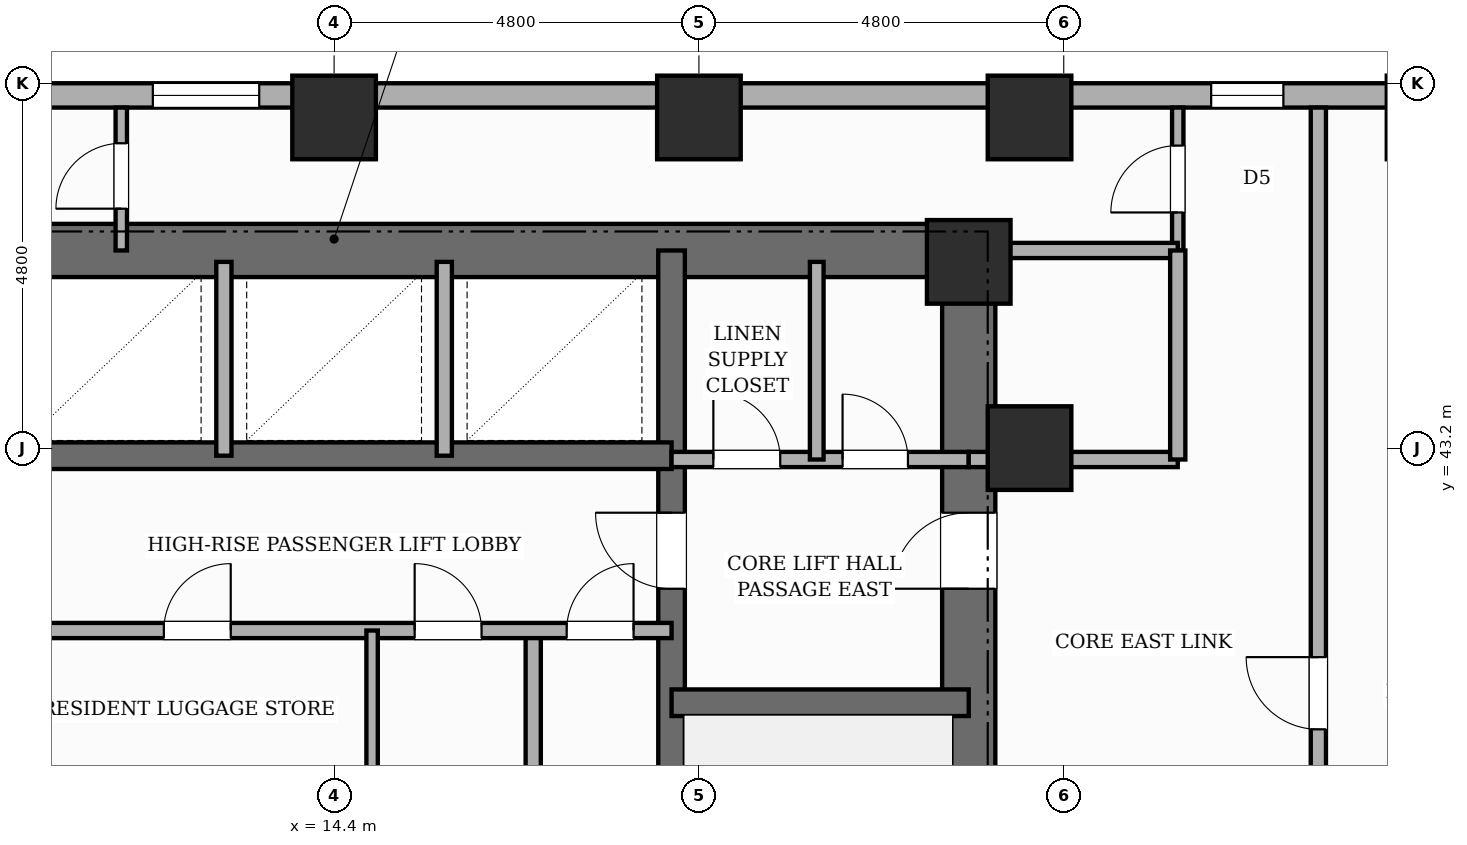
"""IFC4 building model, lengths in metres.
Left out: names, types, materials, properties, quantities, classifications, styles, units other than length and angle.
Written with IfcOpenShell. Run it as: python <this file> out.ifc"""

import sys

from ifc_helpers import new_model, si_unit, direction, frame, frame_2d, origin, origin_2d, place, context, subcontext, project, spatial, rectangle, extrude, element, fill, save


model = new_model("IFC4")
c1 = context("Model", 3, precision=1e-05, world=origin(), true_north=direction((0.0, 1.0)))
c2 = subcontext(c1, "Body", "Model", "MODEL_VIEW")
j1 = project(units=[si_unit("LENGTHUNIT", "METRE"), si_unit("PLANEANGLEUNIT", "RADIAN")], contexts=[c1])
p1 = place(None, origin())
s1 = spatial("IfcSite", under=j1, at=p1, CompositionType="ELEMENT")
p2 = place(p1, origin())
s2 = spatial("IfcBuilding", under=s1, at=p2, CompositionType="ELEMENT")
p3 = place(p2, frame((0.0, 0.0, 28.6)))
s3 = spatial("IfcBuildingStorey", under=s2, at=p3, CompositionType="ELEMENT", Elevation=28.6)
p4 = place(p3, frame((22.75, 30.55, 0.0), z_axis=(0.0, 0.0, 1.0), x_axis=(0.0, 1.0, 0.0)))
e1 = element("IfcWall", 1, at=p4, inside=s3, PredefinedType="SHEAR", context=c2, shape_type="SweptSolid", body=[
    extrude(rectangle(XDim=15.6, YDim=0.7, at=frame_2d((7.8, 0.0))), origin(), (0.0, 0.0, 1.0), 3.6),
])
p5 = place(p4, frame((10.8, 0.0, 0.0)))
e2 = element("IfcOpeningElement", 2, at=p5, cuts=e1, PredefinedType="OPENING", context=c2, shape_type="SweptSolid", body=[
    extrude(rectangle(XDim=1.0, YDim=2.15, at=frame_2d((0.5, 1.075))), frame((0.0, 0.36, 0.0), z_axis=(0.0, -1.0, 0.0), x_axis=(1.0, 0.0, 0.0)), (0.0, 0.0, 1.0), 0.72),
])
p6 = place(p3, frame((6.05, 45.8, 0.0), z_axis=(0.0, 0.0, 1.0), x_axis=(1.0, 0.0, 0.0)))
e3 = element("IfcWall", 3, at=p6, inside=s3, PredefinedType="SHEAR", context=c2, shape_type="SweptSolid", body=[
    extrude(rectangle(XDim=16.7, YDim=0.7, at=frame_2d((8.35, 0.0))), origin(), (0.0, 0.0, 1.0), 3.6),
])
p7 = place(p3, frame((18.84, 30.9, 0.0), z_axis=(0.0, 0.0, 1.0), x_axis=(0.0, 1.0, 0.0)))
e4 = element("IfcWall", 4, at=p7, inside=s3, PredefinedType="SHEAR", context=c2, shape_type="SweptSolid", body=[
    extrude(rectangle(XDim=14.9, YDim=0.35, at=frame_2d((7.45, 0.0))), origin(), (0.0, 0.0, 1.0), 3.6),
])
p8 = place(p7, frame((0.65, 0.0, 0.0)))
e5 = element("IfcOpeningElement", 5, at=p8, cuts=e4, PredefinedType="OPENING", context=c2, shape_type="SweptSolid", body=[
    extrude(rectangle(XDim=0.95, YDim=2.1, at=frame_2d((0.475, 1.05))), frame((0.0, 0.185, 0.0), z_axis=(0.0, -1.0, 0.0), x_axis=(1.0, 0.0, 0.0)), (0.0, 0.0, 1.0), 0.37),
])
p9 = place(p7, frame((10.45, 0.0, 0.0)))
e6 = element("IfcOpeningElement", 6, at=p9, cuts=e4, PredefinedType="OPENING", context=c2, shape_type="SweptSolid", body=[
    extrude(rectangle(XDim=1.0, YDim=2.15, at=frame_2d((0.5, 1.075))), frame((0.0, 0.185, 0.0), z_axis=(0.0, -1.0, 0.0), x_axis=(1.0, 0.0, 0.0)), (0.0, 0.0, 1.0), 0.37),
])
p10 = place(p3, frame((18.84, 39.85, 0.0), z_axis=(0.0, 0.0, 1.0), x_axis=(1.0, 0.0, 0.0)))
e7 = element("IfcWall", 7, at=p10, inside=s3, PredefinedType="SHEAR", context=c2, shape_type="SweptSolid", body=[
    extrude(rectangle(XDim=3.91, YDim=0.35, at=frame_2d((1.955, 0.0))), origin(), (0.0, 0.0, 1.0), 3.6),
])
p11 = place(p3, frame((9.96, 43.1, 0.0), z_axis=(0.0, 0.0, 1.0), x_axis=(1.0, 0.0, 0.0)))
e8 = element("IfcWall", 8, at=p11, inside=s3, PredefinedType="SHEAR", context=c2, shape_type="SweptSolid", body=[
    extrude(rectangle(XDim=8.88, YDim=0.35, at=frame_2d((4.44, 0.0))), origin(), (0.0, 0.0, 1.0), 3.6),
])
for number, where, z_axis, x_axis in (
    (9, (14.4, 47.55, 0.0), (0.0, 0.0, 1.0), (1.0, 0.0, 0.0)),
    (10, (19.2, 47.55, 0.0), (0.0, 0.0, 1.0), (1.0, 0.0, 0.0)),
    (11, (22.75, 45.65, 0.0), (0.0, 0.0, 1.0), (1.0, 0.0, 0.0)),
    (12, (23.55, 43.2, 0.0), (0.0, 0.0, 1.0), (1.0, 0.0, 0.0)),
    (13, (23.55, 47.55, 0.0), (0.0, 0.0, 1.0), (1.0, 0.0, 0.0)),
):
    element("IfcColumn", number, at=place(p3, frame(where, z_axis=z_axis, x_axis=x_axis)), inside=s3, PredefinedType="COLUMN", context=c2, shape_type="SweptSolid", body=[
        extrude(rectangle(XDim=1.1, YDim=1.1, at=origin_2d()), origin(), (0.0, 0.0, 1.0), 3.6),
    ])
p12 = place(p3, frame((7.2, 47.84, 0.0), z_axis=(0.0, 0.0, 1.0), x_axis=(1.0, 0.0, 0.0)))
e14 = element("IfcWall", 14, at=p12, inside=s3, PredefinedType="STANDARD", context=c2, shape_type="SweptSolid", body=[
    extrude(rectangle(XDim=48.0, YDim=0.32, at=frame_2d((24.0, 0.0))), origin(), (0.0, 0.0, 1.0), 2.53),
])
p13 = place(p12, frame((24.97, 0.0, 0.45)))
e15 = element("IfcOpeningElement", 15, at=p13, cuts=e14, PredefinedType="OPENING", context=c2, shape_type="SweptSolid", body=[
    extrude(rectangle(XDim=0.6, YDim=1.8, at=frame_2d((0.3, 0.9))), frame((0.0, 0.17, 0.0), z_axis=(0.0, -1.0, 0.0), x_axis=(1.0, 0.0, 0.0)), (0.0, 0.0, 1.0), 0.34),
])
p14 = place(p12, frame((32.435, 0.0, 0.65)))
e16 = element("IfcOpeningElement", 16, at=p14, cuts=e14, PredefinedType="OPENING", context=c2, shape_type="SweptSolid", body=[
    extrude(rectangle(XDim=1.4, YDim=1.1, at=frame_2d((0.7, 0.55))), frame((0.0, 0.17, 0.0), z_axis=(0.0, -1.0, 0.0), x_axis=(1.0, 0.0, 0.0)), (0.0, 0.0, 1.0), 0.34),
])
p15 = place(p12, frame((47.094, 0.0, 0.45)))
e17 = element("IfcOpeningElement", 17, at=p15, cuts=e14, PredefinedType="OPENING", context=c2, shape_type="SweptSolid", body=[
    extrude(rectangle(XDim=0.6, YDim=1.8, at=frame_2d((0.3, 0.9))), frame((0.0, 0.17, 0.0), z_axis=(0.0, -1.0, 0.0), x_axis=(1.0, 0.0, 0.0)), (0.0, 0.0, 1.0), 0.34),
])
p16 = place(p12, frame((18.74, 0.0, 0.45)))
e18 = element("IfcOpeningElement", 18, at=p16, cuts=e14, PredefinedType="OPENING", context=c2, shape_type="SweptSolid", body=[
    extrude(rectangle(XDim=0.95, YDim=1.8, at=frame_2d((0.475, 0.9))), frame((0.0, 0.17, 0.0), z_axis=(0.0, -1.0, 0.0), x_axis=(1.0, 0.0, 0.0)), (0.0, 0.0, 1.0), 0.34),
])
p17 = place(p12, frame((41.65, 0.0, 0.45)))
e19 = element("IfcOpeningElement", 19, at=p17, cuts=e14, PredefinedType="OPENING", context=c2, shape_type="SweptSolid", body=[
    extrude(rectangle(XDim=0.75, YDim=1.8, at=frame_2d((0.375, 0.9))), frame((0.0, 0.17, 0.0), z_axis=(0.0, -1.0, 0.0), x_axis=(1.0, 0.0, 0.0)), (0.0, 0.0, 1.0), 0.34),
])
p18 = place(p12, frame((37.736, 0.0, 0.65)))
e20 = element("IfcOpeningElement", 20, at=p18, cuts=e14, PredefinedType="OPENING", context=c2, shape_type="SweptSolid", body=[
    extrude(rectangle(XDim=1.4, YDim=1.1, at=frame_2d((0.7, 0.55))), frame((0.0, 0.17, 0.0), z_axis=(0.0, -1.0, 0.0), x_axis=(1.0, 0.0, 0.0)), (0.0, 0.0, 1.0), 0.34),
])
p19 = place(p12, frame((0.47, 0.0, 0.45)))
e21 = element("IfcOpeningElement", 21, at=p19, cuts=e14, PredefinedType="OPENING", context=c2, shape_type="SweptSolid", body=[
    extrude(rectangle(XDim=0.95, YDim=1.8, at=frame_2d((0.475, 0.9))), frame((0.0, 0.17, 0.0), z_axis=(0.0, -1.0, 0.0), x_axis=(1.0, 0.0, 0.0)), (0.0, 0.0, 1.0), 0.34),
])
p20 = place(p12, frame((4.815, 0.0, 0.65)))
e22 = element("IfcOpeningElement", 22, at=p20, cuts=e14, PredefinedType="OPENING", context=c2, shape_type="SweptSolid", body=[
    extrude(rectangle(XDim=1.4, YDim=1.1, at=frame_2d((0.7, 0.55))), frame((0.0, 0.17, 0.0), z_axis=(0.0, -1.0, 0.0), x_axis=(1.0, 0.0, 0.0)), (0.0, 0.0, 1.0), 0.34),
])
p21 = place(p12, frame((22.87, 0.0, 0.65)))
e23 = element("IfcOpeningElement", 23, at=p21, cuts=e14, PredefinedType="OPENING", context=c2, shape_type="SweptSolid", body=[
    extrude(rectangle(XDim=1.4, YDim=1.1, at=frame_2d((0.7, 0.55))), frame((0.0, 0.17, 0.0), z_axis=(0.0, -1.0, 0.0), x_axis=(1.0, 0.0, 0.0)), (0.0, 0.0, 1.0), 0.34),
])
p22 = place(p12, frame((28.03, 0.0, 0.65)))
e24 = element("IfcOpeningElement", 24, at=p22, cuts=e14, PredefinedType="OPENING", context=c2, shape_type="SweptSolid", body=[
    extrude(rectangle(XDim=1.4, YDim=1.1, at=frame_2d((0.7, 0.55))), frame((0.0, 0.17, 0.0), z_axis=(0.0, -1.0, 0.0), x_axis=(1.0, 0.0, 0.0)), (0.0, 0.0, 1.0), 0.34),
])
p23 = place(p12, frame((42.95, 0.0, 0.65)))
e25 = element("IfcOpeningElement", 25, at=p23, cuts=e14, PredefinedType="OPENING", context=c2, shape_type="SweptSolid", body=[
    extrude(rectangle(XDim=1.4, YDim=1.1, at=frame_2d((0.7, 0.55))), frame((0.0, 0.17, 0.0), z_axis=(0.0, -1.0, 0.0), x_axis=(1.0, 0.0, 0.0)), (0.0, 0.0, 1.0), 0.34),
])
p24 = place(p12, frame((45.984, 0.0, 0.45)))
e26 = element("IfcOpeningElement", 26, at=p24, cuts=e14, PredefinedType="OPENING", context=c2, shape_type="SweptSolid", body=[
    extrude(rectangle(XDim=0.6, YDim=1.8, at=frame_2d((0.3, 0.9))), frame((0.0, 0.17, 0.0), z_axis=(0.0, -1.0, 0.0), x_axis=(1.0, 0.0, 0.0)), (0.0, 0.0, 1.0), 0.34),
])
p25 = place(p3, frame((17.02, 35.65, 0.0), z_axis=(0.0, 0.0, 1.0), x_axis=(0.0, 1.0, 0.0)))
e27 = element("IfcWall", 27, at=p25, inside=s3, PredefinedType="POLYGONAL", context=c2, shape_type="SweptSolid", body=[
    extrude(rectangle(XDim=5.15, YDim=0.2, at=frame_2d((2.575, 0.0))), origin(), (0.0, 0.0, 1.0), 3.35),
])
p26 = place(p3, frame((9.96, 40.8, 0.0), z_axis=(0.0, 0.0, 1.0), x_axis=(1.0, 0.0, 0.0)))
e28 = element("IfcWall", 28, at=p26, inside=s3, PredefinedType="POLYGONAL", context=c2, shape_type="SweptSolid", body=[
    extrude(rectangle(XDim=8.88, YDim=0.2, at=frame_2d((4.44, 0.0))), origin(), (0.0, 0.0, 1.0), 3.35),
])
p27 = place(p26, frame((7.5, 0.0, 0.0)))
e29 = element("IfcOpeningElement", 29, at=p27, cuts=e28, PredefinedType="OPENING", context=c2, shape_type="SweptSolid", body=[
    extrude(rectangle(XDim=0.88, YDim=2.1, at=frame_2d((0.44, 1.05))), frame((0.0, 0.11, 0.0), z_axis=(0.0, -1.0, 0.0), x_axis=(1.0, 0.0, 0.0)), (0.0, 0.0, 1.0), 0.22),
])
p28 = place(p26, frame((2.2, 0.0, 0.0)))
e30 = element("IfcOpeningElement", 30, at=p28, cuts=e28, PredefinedType="OPENING", context=c2, shape_type="SweptSolid", body=[
    extrude(rectangle(XDim=0.88, YDim=2.1, at=frame_2d((0.44, 1.05))), frame((0.0, 0.11, 0.0), z_axis=(0.0, -1.0, 0.0), x_axis=(1.0, 0.0, 0.0)), (0.0, 0.0, 1.0), 0.22),
])
p29 = place(p26, frame((5.5, 0.0, 0.0)))
e31 = element("IfcOpeningElement", 31, at=p29, cuts=e28, PredefinedType="OPENING", context=c2, shape_type="SweptSolid", body=[
    extrude(rectangle(XDim=0.88, YDim=2.1, at=frame_2d((0.44, 1.05))), frame((0.0, 0.11, 0.0), z_axis=(0.0, -1.0, 0.0), x_axis=(1.0, 0.0, 0.0)), (0.0, 0.0, 1.0), 0.22),
])
p30 = place(p3, frame((18.84, 43.05, 0.0), z_axis=(0.0, 0.0, 1.0), x_axis=(1.0, 0.0, 0.0)))
e32 = element("IfcWall", 32, at=p30, inside=s3, PredefinedType="POLYGONAL", context=c2, shape_type="SweptSolid", body=[
    extrude(rectangle(XDim=3.91, YDim=0.2, at=frame_2d((1.955, 0.0))), origin(), (0.0, 0.0, 1.0), 2.53),
])
p31 = place(p30, frame((0.55, 0.0, 0.0)))
e33 = element("IfcOpeningElement", 33, at=p31, cuts=e32, PredefinedType="OPENING", context=c2, shape_type="SweptSolid", body=[
    extrude(rectangle(XDim=0.88, YDim=2.1, at=frame_2d((0.44, 1.05))), frame((0.0, 0.11, 0.0), z_axis=(0.0, -1.0, 0.0), x_axis=(1.0, 0.0, 0.0)), (0.0, 0.0, 1.0), 0.22),
])
p32 = place(p30, frame((2.25, 0.0, 0.0)))
e34 = element("IfcOpeningElement", 34, at=p32, cuts=e32, PredefinedType="OPENING", context=c2, shape_type="SweptSolid", body=[
    extrude(rectangle(XDim=0.86, YDim=2.1, at=frame_2d((0.43, 1.05))), frame((0.0, 0.11, 0.0), z_axis=(0.0, -1.0, 0.0), x_axis=(1.0, 0.0, 0.0)), (0.0, 0.0, 1.0), 0.22),
])
for number, where, z_axis, x_axis in (
    (35, (12.95, 43.1, 0.0), (0.0, 0.0, 1.0), (0.0, 1.0, 0.0)),
    (36, (15.85, 43.1, 0.0), (0.0, 0.0, 1.0), (0.0, 1.0, 0.0)),
):
    element("IfcWall", number, at=place(p3, frame(where, z_axis=z_axis, x_axis=x_axis)), inside=s3, PredefinedType="POLYGONAL", context=c2, shape_type="SweptSolid", body=[
        extrude(rectangle(XDim=2.55, YDim=0.2, at=frame_2d((1.275, 0.0))), origin(), (0.0, 0.0, 1.0), 3.35),
    ])
p33 = place(p3, frame((14.9, 38.72, 0.0), z_axis=(0.0, 0.0, 1.0), x_axis=(0.0, 1.0, 0.0)))
e37 = element("IfcWall", 37, at=p33, inside=s3, PredefinedType="PARTITIONING", context=c2, shape_type="SweptSolid", body=[
    extrude(rectangle(XDim=2.08, YDim=0.15, at=frame_2d((1.04, 0.0))), origin(), (0.0, 0.0, 1.0), 3.35),
])
p34 = place(p3, frame((20.75, 43.05, 0.0), z_axis=(0.0, 0.0, 1.0), x_axis=(0.0, 1.0, 0.0)))
e38 = element("IfcWall", 38, at=p34, inside=s3, PredefinedType="PLUMBINGWALL", context=c2, shape_type="SweptSolid", body=[
    extrude(rectangle(XDim=2.6, YDim=0.18, at=frame_2d((1.3, 0.0))), origin(), (0.0, 0.0, 1.0), 3.35),
])
p35 = place(p3, frame((25.5, 45.8, 0.0), z_axis=(0.0, 0.0, 1.0), x_axis=(0.0, 1.0, 0.0)))
e39 = element("IfcWall", 39, at=p35, inside=s3, PredefinedType="PARTITIONING", context=c2, shape_type="SweptSolid", body=[
    extrude(rectangle(XDim=1.88, YDim=0.15, at=frame_2d((0.94, 0.0))), origin(), (0.0, 0.0, 1.0), 3.35),
])
p36 = place(p35, frame((0.5, 0.0, 0.0)))
e40 = element("IfcOpeningElement", 40, at=p36, cuts=e39, PredefinedType="OPENING", context=c2, shape_type="SweptSolid", body=[
    extrude(rectangle(XDim=0.88, YDim=2.1, at=frame_2d((0.44, 1.05))), frame((0.0, 0.085, 0.0), z_axis=(0.0, -1.0, 0.0), x_axis=(1.0, 0.0, 0.0)), (0.0, 0.0, 1.0), 0.17),
])
p37 = place(p3, frame((22.75, 45.8, 0.0), z_axis=(0.0, 0.0, 1.0), x_axis=(1.0, 0.0, 0.0)))
e41 = element("IfcWall", 41, at=p37, inside=s3, PredefinedType="PARTITIONING", context=c2, shape_type="SweptSolid", body=[
    extrude(rectangle(XDim=2.75, YDim=0.2, at=frame_2d((1.375, 0.0))), origin(), (0.0, 0.0, 1.0), 3.35),
])
p38 = place(p3, frame((11.6, 45.8, 0.0), z_axis=(0.0, 0.0, 1.0), x_axis=(0.0, 1.0, 0.0)))
e42 = element("IfcWall", 42, at=p38, inside=s3, PredefinedType="PARTITIONING", context=c2, shape_type="SweptSolid", body=[
    extrude(rectangle(XDim=1.88, YDim=0.15, at=frame_2d((0.94, 0.0))), origin(), (0.0, 0.0, 1.0), 3.35),
])
p39 = place(p38, frame((0.55, 0.0, 0.0)))
e43 = element("IfcOpeningElement", 43, at=p39, cuts=e42, PredefinedType="OPENING", context=c2, shape_type="SweptSolid", body=[
    extrude(rectangle(XDim=0.86, YDim=2.1, at=frame_2d((0.43, 1.05))), frame((0.0, 0.085, 0.0), z_axis=(0.0, -1.0, 0.0), x_axis=(1.0, 0.0, 0.0)), (0.0, 0.0, 1.0), 0.17),
])
p40 = place(p3, frame((27.35, 38.3, 0.0), z_axis=(0.0, 0.0, 1.0), x_axis=(0.0, 1.0, 0.0)))
e44 = element("IfcWall", 44, at=p40, inside=s3, PredefinedType="PARTITIONING", context=c2, shape_type="SweptSolid", body=[
    extrude(rectangle(XDim=9.38, YDim=0.2, at=frame_2d((4.69, 0.0))), origin(), (0.0, 0.0, 1.0), 3.35),
])
p41 = place(p40, frame((1.2, 0.0, 0.0)))
e45 = element("IfcOpeningElement", 45, at=p41, cuts=e44, PredefinedType="OPENING", context=c2, shape_type="SweptSolid", body=[
    extrude(rectangle(XDim=0.95, YDim=2.15, at=frame_2d((0.475, 1.075))), frame((0.0, 0.11, 0.0), z_axis=(0.0, -1.0, 0.0), x_axis=(1.0, 0.0, 0.0)), (0.0, 0.0, 1.0), 0.22),
])
p42 = place(p3, frame((22.75, 43.05, 0.0), z_axis=(0.0, 0.0, 1.0), x_axis=(1.0, 0.0, 0.0)))
e46 = element("IfcWall", 46, at=p42, inside=s3, PredefinedType="PARTITIONING", context=c2, shape_type="SweptSolid", body=[
    extrude(rectangle(XDim=2.75, YDim=0.2, at=frame_2d((1.375, 0.0))), origin(), (0.0, 0.0, 1.0), 2.53),
])
p43 = place(p3, frame((25.5, 43.05, 0.0), z_axis=(0.0, 0.0, 1.0), x_axis=(0.0, 1.0, 0.0)))
e47 = element("IfcWall", 47, at=p43, inside=s3, PredefinedType="PARTITIONING", context=c2, shape_type="SweptSolid", body=[
    extrude(rectangle(XDim=2.75, YDim=0.2, at=frame_2d((1.375, 0.0))), origin(), (0.0, 0.0, 1.0), 3.35),
])
p44 = place(p16, origin())
e48 = element("IfcWindow", 48, at=p44, inside=s3, PartitioningType="SINGLE_PANEL", PredefinedType="WINDOW", context=c2, shape_type="SweptSolid", body=[
    extrude(rectangle(XDim=0.95, YDim=1.8, at=frame_2d((0.475, 0.9))), frame((0.0, 0.03, 0.0), z_axis=(0.0, -1.0, 0.0), x_axis=(1.0, 0.0, 0.0)), (0.0, 0.0, 1.0), 0.06),
])
fill(e18, e48)
p45 = place(p20, origin())
e49 = element("IfcWindow", 49, at=p45, inside=s3, PartitioningType="SINGLE_PANEL", PredefinedType="WINDOW", context=c2, shape_type="SweptSolid", body=[
    extrude(rectangle(XDim=1.4, YDim=1.1, at=frame_2d((0.7, 0.55))), frame((0.0, 0.03, 0.0), z_axis=(0.0, -1.0, 0.0), x_axis=(1.0, 0.0, 0.0)), (0.0, 0.0, 1.0), 0.06),
])
fill(e22, e49)
p46 = place(p27, origin())
e50 = element("IfcDoor", 50, at=p46, inside=s3, OperationType="SINGLE_SWING_RIGHT", PredefinedType="DOOR", context=c2, shape_type="SweptSolid", body=[
    extrude(rectangle(XDim=0.88, YDim=2.1, at=frame_2d((0.44, 1.05))), frame((0.0, 0.025, 0.0), z_axis=(0.0, -1.0, 0.0), x_axis=(1.0, 0.0, 0.0)), (0.0, 0.0, 1.0), 0.05),
])
fill(e29, e50)
p47 = place(p9, origin())
e51 = element("IfcDoor", 51, at=p47, inside=s3, OperationType="SINGLE_SWING_RIGHT", PredefinedType="DOOR", context=c2, shape_type="SweptSolid", body=[
    extrude(rectangle(XDim=1.0, YDim=2.15, at=frame_2d((0.5, 1.075))), frame((0.0, 0.025, 0.0), z_axis=(0.0, -1.0, 0.0), x_axis=(1.0, 0.0, 0.0)), (0.0, 0.0, 1.0), 0.05),
])
fill(e6, e51)
p48 = place(p5, origin())
e52 = element("IfcDoor", 52, at=p48, inside=s3, OperationType="SINGLE_SWING_LEFT", PredefinedType="DOOR", context=c2, shape_type="SweptSolid", body=[
    extrude(rectangle(XDim=1.0, YDim=2.15, at=frame_2d((0.5, 1.075))), frame((0.0, 0.025, 0.0), z_axis=(0.0, -1.0, 0.0), x_axis=(1.0, 0.0, 0.0)), (0.0, 0.0, 1.0), 0.05),
])
fill(e2, e52)
p49 = place(p28, origin())
e53 = element("IfcDoor", 53, at=p49, inside=s3, OperationType="SINGLE_SWING_RIGHT", PredefinedType="DOOR", context=c2, shape_type="SweptSolid", body=[
    extrude(rectangle(XDim=0.88, YDim=2.1, at=frame_2d((0.44, 1.05))), frame((0.0, 0.025, 0.0), z_axis=(0.0, -1.0, 0.0), x_axis=(1.0, 0.0, 0.0)), (0.0, 0.0, 1.0), 0.05),
])
fill(e30, e53)
p50 = place(p29, origin())
e54 = element("IfcDoor", 54, at=p50, inside=s3, OperationType="SINGLE_SWING_LEFT", PredefinedType="DOOR", context=c2, shape_type="SweptSolid", body=[
    extrude(rectangle(XDim=0.88, YDim=2.1, at=frame_2d((0.44, 1.05))), frame((0.0, 0.025, 0.0), z_axis=(0.0, -1.0, 0.0), x_axis=(1.0, 0.0, 0.0)), (0.0, 0.0, 1.0), 0.05),
])
fill(e31, e54)
p51 = place(p31, origin())
e55 = element("IfcDoor", 55, at=p51, inside=s3, OperationType="SINGLE_SWING_LEFT", PredefinedType="DOOR", context=c2, shape_type="SweptSolid", body=[
    extrude(rectangle(XDim=0.88, YDim=2.1, at=frame_2d((0.44, 1.05))), frame((0.0, 0.025, 0.0), z_axis=(0.0, -1.0, 0.0), x_axis=(1.0, 0.0, 0.0)), (0.0, 0.0, 1.0), 0.05),
])
fill(e33, e55)
p52 = place(p32, origin())
e56 = element("IfcDoor", 56, at=p52, inside=s3, OperationType="SINGLE_SWING_LEFT", PredefinedType="DOOR", context=c2, shape_type="SweptSolid", body=[
    extrude(rectangle(XDim=0.86, YDim=2.1, at=frame_2d((0.43, 1.05))), frame((0.0, 0.025, 0.0), z_axis=(0.0, -1.0, 0.0), x_axis=(1.0, 0.0, 0.0)), (0.0, 0.0, 1.0), 0.05),
])
fill(e34, e56)
p53 = place(p36, origin())
e57 = element("IfcDoor", 57, at=p53, inside=s3, OperationType="SINGLE_SWING_LEFT", PredefinedType="DOOR", context=c2, shape_type="SweptSolid", body=[
    extrude(rectangle(XDim=0.88, YDim=2.1, at=frame_2d((0.44, 1.05))), frame((0.0, 0.025, 0.0), z_axis=(0.0, -1.0, 0.0), x_axis=(1.0, 0.0, 0.0)), (0.0, 0.0, 1.0), 0.05),
])
fill(e40, e57)
p54 = place(p39, origin())
e58 = element("IfcDoor", 58, at=p54, inside=s3, OperationType="SINGLE_SWING_LEFT", PredefinedType="DOOR", context=c2, shape_type="SweptSolid", body=[
    extrude(rectangle(XDim=0.86, YDim=2.1, at=frame_2d((0.43, 1.05))), frame((0.0, 0.025, 0.0), z_axis=(0.0, -1.0, 0.0), x_axis=(1.0, 0.0, 0.0)), (0.0, 0.0, 1.0), 0.05),
])
fill(e43, e58)
p55 = place(p41, origin())
e59 = element("IfcDoor", 59, at=p55, inside=s3, OperationType="SINGLE_SWING_RIGHT", PredefinedType="DOOR", context=c2, shape_type="SweptSolid", body=[
    extrude(rectangle(XDim=0.95, YDim=2.15, at=frame_2d((0.475, 1.075))), frame((0.0, 0.025, 0.0), z_axis=(0.0, -1.0, 0.0), x_axis=(1.0, 0.0, 0.0)), (0.0, 0.0, 1.0), 0.05),
])
fill(e45, e59)
save(model, sys.argv[1])
